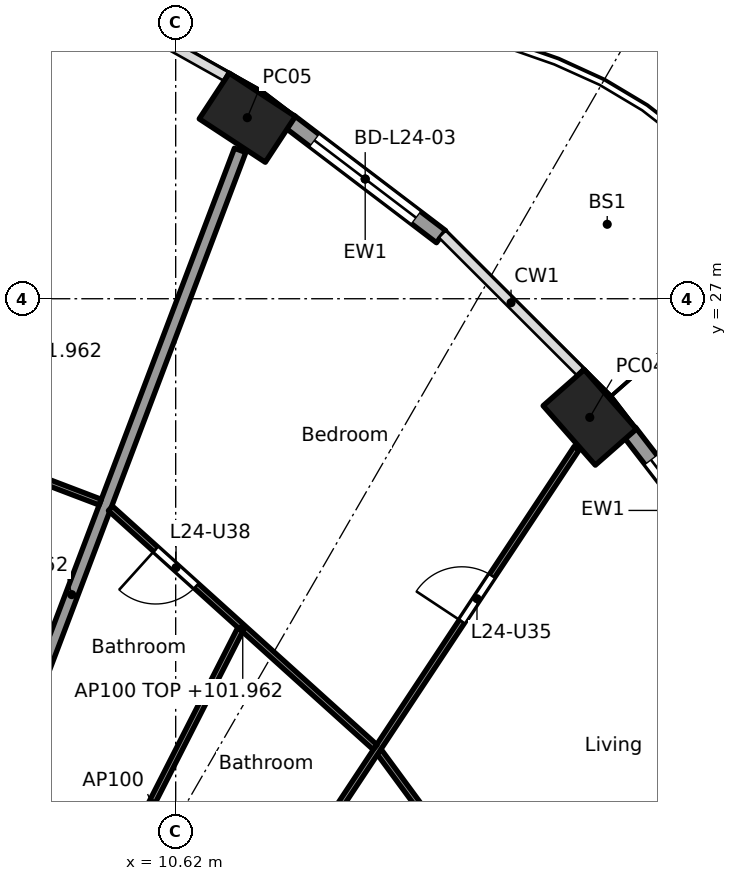
"""IFC4 building model, lengths in metres.
Left out: names, types, materials, properties, quantities, classifications, styles, units other than length and angle.
Written with IfcOpenShell. Run it as: python <this file> out.ifc"""

import sys

from ifc_helpers import new_model, si_unit, direction, frame, frame_2d, origin, origin_2d, place, context, subcontext, project, spatial, rectangle, hollow_rectangle, extrude, element, fill, save


model = new_model("IFC4")
c1 = context("Model", 3, precision=1e-05, world=origin(), true_north=direction((0.0, 1.0)))
c2 = subcontext(c1, "Body", "Model", "MODEL_VIEW")
j1 = project(units=[si_unit("LENGTHUNIT", "METRE"), si_unit("PLANEANGLEUNIT", "RADIAN")], contexts=[c1])
p1 = place(None, origin())
s1 = spatial("IfcSite", under=j1, at=p1, CompositionType="ELEMENT")
p2 = place(p1, origin())
s2 = spatial("IfcBuilding", under=s1, at=p2, CompositionType="ELEMENT")
p3 = place(p2, frame((0.0, 0.0, 99.2)))
s3 = spatial("IfcBuildingStorey", under=s2, at=p3, CompositionType="ELEMENT", Elevation=99.2)
for number, where, z_axis, x_axis in (
    (1, (17.43, 25.049, 0.0), (0.0, 0.0, 1.0), (-0.66, 0.751, 0.0)),
    (2, (11.798, 29.978, 0.0), (0.0, 0.0, 1.0), (-0.836, 0.549, 0.0)),
):
    element("IfcColumn", number, at=place(p3, frame(where, z_axis=z_axis, x_axis=x_axis)), inside=s3, PredefinedType="COLUMN", context=c2, shape_type="SweptSolid", body=[
        extrude(hollow_rectangle(XDim=1.3, YDim=0.9, WallThickness=0.045, at=origin_2d()), origin(), (0.0, 0.0, 1.0), 3.7),
    ])
p4 = place(p3, frame((18.081, 24.811, 0.0), z_axis=(0.0, 0.0, 1.0), x_axis=(0.610458970322, -0.792047880847, 0.0)))
e3 = element("IfcWall", 3, at=p4, inside=s3, PredefinedType="SOLIDWALL", context=c2, shape_type="SweptSolid", body=[
    extrude(rectangle(XDim=3.263, YDim=0.25, at=frame_2d((1.631, 0.0))), origin(), (0.0, 0.0, 1.0), 3.44),
])
p5 = place(p4, frame((0.582, 0.0, 0.0)))
e4 = element("IfcOpeningElement", 4, at=p5, cuts=e3, PredefinedType="OPENING", context=c2, shape_type="SweptSolid", body=[
    extrude(rectangle(XDim=2.1, YDim=2.4, at=frame_2d((1.05, 1.2))), frame((0.0, 0.135, 0.0), z_axis=(0.0, -1.0, 0.0), x_axis=(1.0, 0.0, 0.0)), (0.0, 0.0, 1.0), 0.27),
])
p6 = place(p3, frame((12.489, 29.917, 0.0), z_axis=(0.0, 0.0, 1.0), x_axis=(0.796037575978, -0.605247203736, 0.0)))
e5 = element("IfcWall", 5, at=p6, inside=s3, PredefinedType="SOLIDWALL", context=c2, shape_type="SweptSolid", body=[
    extrude(rectangle(XDim=3.134, YDim=0.25, at=frame_2d((1.567, 0.0))), origin(), (0.0, 0.0, 1.0), 3.44),
])
p7 = place(p6, frame((0.517, 0.0, 0.0)))
e6 = element("IfcOpeningElement", 6, at=p7, cuts=e5, PredefinedType="OPENING", context=c2, shape_type="SweptSolid", body=[
    extrude(rectangle(XDim=2.1, YDim=2.4, at=frame_2d((1.05, 1.2))), frame((0.0, 0.135, 0.0), z_axis=(0.0, -1.0, 0.0), x_axis=(1.0, 0.0, 0.0)), (0.0, 0.0, 1.0), 0.27),
])
p8 = place(p3, frame((6.141, 14.829, 0.0), z_axis=(0.0, 0.0, 1.0), x_axis=(0.354477134193, 0.935064682968, 0.0)))
e7 = element("IfcWall", 7, at=p8, inside=s3, PredefinedType="PARTITIONING", context=c2, shape_type="SweptSolid", body=[
    extrude(rectangle(XDim=15.626, YDim=0.2, at=frame_2d((7.813, 0.0))), origin(), (0.0, 0.0, 1.0), 2.762),
])
p9 = place(p3, frame((17.567, 14.653, 0.0), z_axis=(0.0, 0.0, 1.0), x_axis=(-0.592391983588, 0.80564988536, 0.0)))
e8 = element("IfcWall", 8, at=p9, inside=s3, PredefinedType="PARTITIONING", context=c2, shape_type="SweptSolid", body=[
    extrude(rectangle(XDim=6.08, YDim=0.1, at=frame_2d((3.04, 0.0))), origin(), (0.0, 0.0, 1.0), 2.762),
])
p10 = place(p9, frame((2.59, 0.0, 0.0)))
e9 = element("IfcOpeningElement", 9, at=p10, cuts=e8, PredefinedType="OPENING", context=c2, shape_type="SweptSolid", body=[
    extrude(rectangle(XDim=0.9, YDim=2.1, at=frame_2d((0.45, 1.05))), frame((0.0, 0.06, 0.0), z_axis=(0.0, -1.0, 0.0), x_axis=(1.0, 0.0, 0.0)), (0.0, 0.0, 1.0), 0.12),
])
p11 = place(p3, frame((7.713, 10.195, 0.0), z_axis=(0.0, 0.0, 1.0), x_axis=(0.552111071171, 0.833770571015, 0.0)))
e10 = element("IfcWall", 10, at=p11, inside=s3, PredefinedType="PARTITIONING", context=c2, shape_type="SweptSolid", body=[
    extrude(rectangle(XDim=17.208, YDim=0.1, at=frame_2d((8.604, 0.0))), origin(), (0.0, 0.0, 1.0), 2.687),
])
p12 = place(p11, frame((1.976, 0.0, 0.0)))
e11 = element("IfcOpeningElement", 11, at=p12, cuts=e10, PredefinedType="OPENING", context=c2, shape_type="SweptSolid", body=[
    extrude(rectangle(XDim=0.9, YDim=2.1, at=frame_2d((0.45, 1.05))), frame((0.0, 0.06, 0.0), z_axis=(0.0, -1.0, 0.0), x_axis=(1.0, 0.0, 0.0)), (0.0, 0.0, 1.0), 0.12),
])
p13 = place(p11, frame((7.611, 0.0, 0.0)))
e12 = element("IfcOpeningElement", 12, at=p13, cuts=e10, PredefinedType="OPENING", context=c2, shape_type="SweptSolid", body=[
    extrude(rectangle(XDim=0.9, YDim=2.1, at=frame_2d((0.45, 1.05))), frame((0.0, 0.06, 0.0), z_axis=(0.0, -1.0, 0.0), x_axis=(1.0, 0.0, 0.0)), (0.0, 0.0, 1.0), 0.12),
])
p14 = place(p11, frame((13.79, 0.0, 0.0)))
e13 = element("IfcOpeningElement", 13, at=p14, cuts=e10, PredefinedType="OPENING", context=c2, shape_type="SweptSolid", body=[
    extrude(rectangle(XDim=0.9, YDim=2.1, at=frame_2d((0.45, 1.05))), frame((0.0, 0.06, 0.0), z_axis=(0.0, -1.0, 0.0), x_axis=(1.0, 0.0, 0.0)), (0.0, 0.0, 1.0), 0.12),
])
p15 = place(p3, frame((13.898, 19.625, 0.0), z_axis=(0.0, 0.0, 1.0), x_axis=(-0.742396654702, 0.669960601146, 0.0)))
e14 = element("IfcWall", 14, at=p15, inside=s3, PredefinedType="PARTITIONING", context=c2, shape_type="SweptSolid", body=[
    extrude(rectangle(XDim=5.861, YDim=0.1, at=frame_2d((2.931, 0.0))), origin(), (0.0, 0.0, 1.0), 2.762),
])
p16 = place(p15, frame((3.958, 0.0, 0.0)))
e15 = element("IfcOpeningElement", 15, at=p16, cuts=e14, PredefinedType="OPENING", context=c2, shape_type="SweptSolid", body=[
    extrude(rectangle(XDim=0.9, YDim=2.1, at=frame_2d((0.45, 1.05))), frame((0.0, 0.06, 0.0), z_axis=(0.0, -1.0, 0.0), x_axis=(1.0, 0.0, 0.0)), (0.0, 0.0, 1.0), 0.12),
])
p17 = place(p3, frame((8.769, 15.846, 0.0), z_axis=(0.0, 0.0, 1.0), x_axis=(0.454067187552, 0.890967445639, 0.0)))
e16 = element("IfcWall", 16, at=p17, inside=s3, PredefinedType="PARTITIONING", context=c2, shape_type="SweptSolid", body=[
    extrude(rectangle(XDim=6.414, YDim=0.1, at=frame_2d((3.207, 0.0))), origin(), (0.0, 0.0, 1.0), 3.44),
])
p18 = place(p3, frame((9.379, 23.655, 0.0), z_axis=(0.0, 0.0, 1.0), x_axis=(-0.934609369022, 0.355675873986, 0.0)))
e17 = element("IfcWall", 17, at=p18, inside=s3, PredefinedType="PARTITIONING", context=c2, shape_type="SweptSolid", body=[
    extrude(rectangle(XDim=5.467, YDim=0.1, at=frame_2d((2.733, 0.0))), origin(), (0.0, 0.0, 1.0), 2.762),
])
p19 = place(p18, frame((2.258, 0.0, 0.0)))
e18 = element("IfcOpeningElement", 18, at=p19, cuts=e17, PredefinedType="OPENING", context=c2, shape_type="SweptSolid", body=[
    extrude(rectangle(XDim=0.9, YDim=2.1, at=frame_2d((0.45, 1.05))), frame((0.0, 0.06, 0.0), z_axis=(0.0, -1.0, 0.0), x_axis=(1.0, 0.0, 0.0)), (0.0, 0.0, 1.0), 0.12),
])
p20 = place(p5, origin())
e19 = element("IfcDoor", 19, at=p20, inside=s3, OperationType="SLIDING_TO_LEFT", PredefinedType="DOOR", context=c2, shape_type="SweptSolid", body=[
    extrude(rectangle(XDim=2.1, YDim=2.4, at=frame_2d((1.05, 1.2))), frame((0.0, 0.025, 0.0), z_axis=(0.0, -1.0, 0.0), x_axis=(1.0, 0.0, 0.0)), (0.0, 0.0, 1.0), 0.05),
])
fill(e4, e19)
p21 = place(p7, origin())
e20 = element("IfcDoor", 20, at=p21, inside=s3, OperationType="SLIDING_TO_LEFT", PredefinedType="DOOR", context=c2, shape_type="SweptSolid", body=[
    extrude(rectangle(XDim=2.1, YDim=2.4, at=frame_2d((1.05, 1.2))), frame((0.0, 0.025, 0.0), z_axis=(0.0, -1.0, 0.0), x_axis=(1.0, 0.0, 0.0)), (0.0, 0.0, 1.0), 0.05),
])
fill(e6, e20)
p22 = place(p14, origin())
e21 = element("IfcDoor", 21, at=p22, inside=s3, OperationType="SINGLE_SWING_LEFT", PredefinedType="DOOR", context=c2, shape_type="SweptSolid", body=[
    extrude(rectangle(XDim=0.9, YDim=2.1, at=frame_2d((0.45, 1.05))), frame((0.0, 0.025, 0.0), z_axis=(0.0, -1.0, 0.0), x_axis=(1.0, 0.0, 0.0)), (0.0, 0.0, 1.0), 0.05),
])
fill(e13, e21)
p23 = place(p16, origin())
e22 = element("IfcDoor", 22, at=p23, inside=s3, OperationType="SINGLE_SWING_RIGHT", PredefinedType="DOOR", context=c2, shape_type="SweptSolid", body=[
    extrude(rectangle(XDim=0.9, YDim=2.1, at=frame_2d((0.45, 1.05))), frame((0.0, 0.025, 0.0), z_axis=(0.0, -1.0, 0.0), x_axis=(1.0, 0.0, 0.0)), (0.0, 0.0, 1.0), 0.05),
])
fill(e15, e22)
save(model, sys.argv[1])
